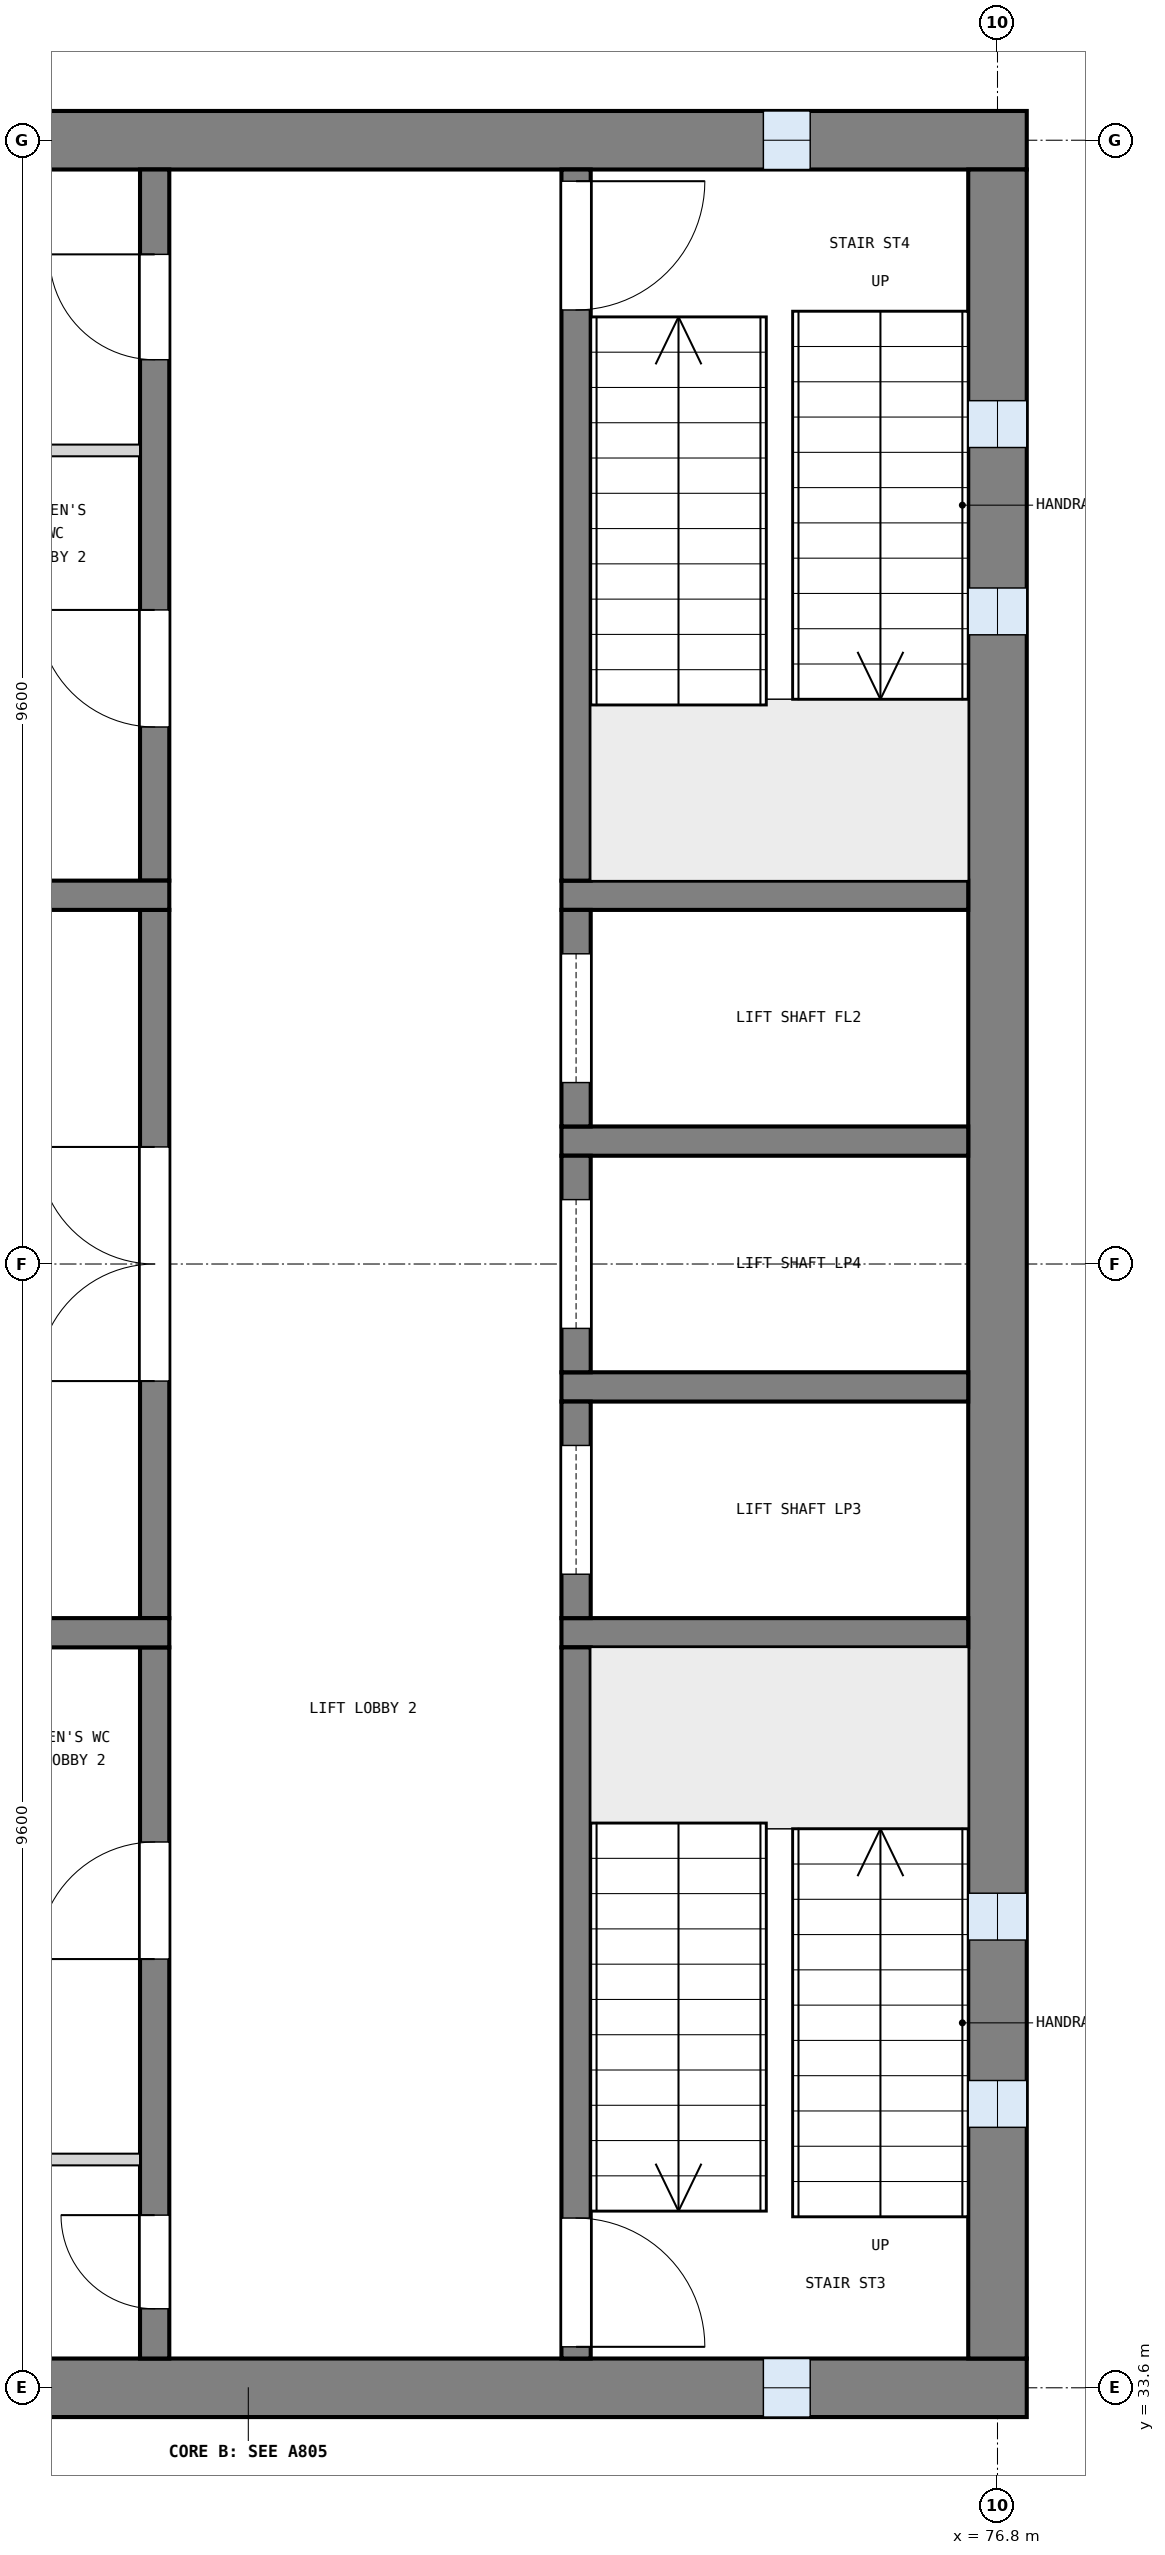
"""IFC4 building model, lengths in metres.
Left out: names, types, materials, properties, quantities, classifications, styles, units other than length and angle.
Written with IfcOpenShell. Run it as: python <this file> out.ifc"""

import sys

from ifc_helpers import new_model, si_unit, direction, frame, frame_2d, origin, place, context, subcontext, project, spatial, rectangle, extrude, element, fill, save


model = new_model("IFC4")
c1 = context("Model", 3, precision=1e-05, world=origin(), true_north=direction((0.0, 1.0)))
c2 = subcontext(c1, "Body", "Model", "MODEL_VIEW")
j1 = project(units=[si_unit("LENGTHUNIT", "METRE"), si_unit("PLANEANGLEUNIT", "RADIAN")], contexts=[c1])
p1 = place(None, origin())
s1 = spatial("IfcSite", under=j1, at=p1, CompositionType="ELEMENT")
p2 = place(p1, origin())
s2 = spatial("IfcBuilding", under=s1, at=p2, CompositionType="ELEMENT")
p3 = place(p2, frame((0.0, 0.0, 12.9)))
s3 = spatial("IfcBuildingStorey", under=s2, at=p3, CompositionType="ELEMENT", Elevation=12.9)
p4 = place(p3, frame((63.75, 52.8, 0.0), z_axis=(0.0, 0.0, 1.0), x_axis=(1.0, 0.0, 0.0)))
e1 = element("IfcWall", 1, at=p4, inside=s3, PredefinedType="SHEAR", context=c2, shape_type="SweptSolid", body=[
    extrude(rectangle(XDim=13.3, YDim=0.5, at=frame_2d((6.65, 0.0))), origin(), (0.0, 0.0, 1.0), 4.2),
])
p5 = place(p4, frame((11.05, 0.0, 1.0)))
e2 = element("IfcOpeningElement", 2, at=p5, cuts=e1, PredefinedType="OPENING", context=c2, shape_type="SweptSolid", body=[
    extrude(rectangle(XDim=0.4, YDim=2.0, at=frame_2d((0.2, 1.0))), frame((0.0, 0.26, 0.0), z_axis=(0.0, -1.0, 0.0), x_axis=(1.0, 0.0, 0.0)), (0.0, 0.0, 1.0), 0.52),
])
p6 = place(p3, frame((63.75, 33.6, 0.0), z_axis=(0.0, 0.0, 1.0), x_axis=(1.0, 0.0, 0.0)))
e3 = element("IfcWall", 3, at=p6, inside=s3, PredefinedType="SHEAR", context=c2, shape_type="SweptSolid", body=[
    extrude(rectangle(XDim=13.3, YDim=0.5, at=frame_2d((6.65, 0.0))), origin(), (0.0, 0.0, 1.0), 4.2),
])
p7 = place(p6, frame((11.05, 0.0, 1.0)))
e4 = element("IfcOpeningElement", 4, at=p7, cuts=e3, PredefinedType="OPENING", context=c2, shape_type="SweptSolid", body=[
    extrude(rectangle(XDim=0.4, YDim=2.0, at=frame_2d((0.2, 1.0))), frame((0.0, 0.26, 0.0), z_axis=(0.0, -1.0, 0.0), x_axis=(1.0, 0.0, 0.0)), (0.0, 0.0, 1.0), 0.52),
])
p8 = place(p3, frame((76.8, 33.85, 0.0), z_axis=(0.0, 0.0, 1.0), x_axis=(0.0, 1.0, 0.0)))
e5 = element("IfcWall", 5, at=p8, inside=s3, PredefinedType="SHEAR", context=c2, shape_type="SweptSolid", body=[
    extrude(rectangle(XDim=18.7, YDim=0.5, at=frame_2d((9.35, 0.0))), origin(), (0.0, 0.0, 1.0), 4.2),
])
p9 = place(p8, frame((1.975, 0.0, 1.0)))
e6 = element("IfcOpeningElement", 6, at=p9, cuts=e5, PredefinedType="OPENING", context=c2, shape_type="SweptSolid", body=[
    extrude(rectangle(XDim=0.4, YDim=2.0, at=frame_2d((0.2, 1.0))), frame((0.0, 0.26, 0.0), z_axis=(0.0, -1.0, 0.0), x_axis=(1.0, 0.0, 0.0)), (0.0, 0.0, 1.0), 0.52),
])
p10 = place(p8, frame((3.575, 0.0, 1.0)))
e7 = element("IfcOpeningElement", 7, at=p10, cuts=e5, PredefinedType="OPENING", context=c2, shape_type="SweptSolid", body=[
    extrude(rectangle(XDim=0.4, YDim=2.0, at=frame_2d((0.2, 1.0))), frame((0.0, 0.26, 0.0), z_axis=(0.0, -1.0, 0.0), x_axis=(1.0, 0.0, 0.0)), (0.0, 0.0, 1.0), 0.52),
])
p11 = place(p8, frame((14.725, 0.0, 1.0)))
e8 = element("IfcOpeningElement", 8, at=p11, cuts=e5, PredefinedType="OPENING", context=c2, shape_type="SweptSolid", body=[
    extrude(rectangle(XDim=0.4, YDim=2.0, at=frame_2d((0.2, 1.0))), frame((0.0, 0.26, 0.0), z_axis=(0.0, -1.0, 0.0), x_axis=(1.0, 0.0, 0.0)), (0.0, 0.0, 1.0), 0.52),
])
p12 = place(p8, frame((16.325, 0.0, 1.0)))
e9 = element("IfcOpeningElement", 9, at=p12, cuts=e5, PredefinedType="OPENING", context=c2, shape_type="SweptSolid", body=[
    extrude(rectangle(XDim=0.4, YDim=2.0, at=frame_2d((0.2, 1.0))), frame((0.0, 0.26, 0.0), z_axis=(0.0, -1.0, 0.0), x_axis=(1.0, 0.0, 0.0)), (0.0, 0.0, 1.0), 0.52),
])
for number, where, z_axis, x_axis in (
    (10, (76.55, 40.05, 0.0), (0.0, 0.0, 1.0), (-1.0, 0.0, 0.0)),
    (11, (76.55, 42.15, 0.0), (0.0, 0.0, 1.0), (-1.0, 0.0, 0.0)),
    (12, (76.55, 44.25, 0.0), (0.0, 0.0, 1.0), (-1.0, 0.0, 0.0)),
    (13, (76.55, 46.35, 0.0), (0.0, 0.0, 1.0), (-1.0, 0.0, 0.0)),
):
    element("IfcWall", number, at=place(p3, frame(where, z_axis=z_axis, x_axis=x_axis)), inside=s3, PredefinedType="SOLIDWALL", context=c2, shape_type="SweptSolid", body=[
        extrude(rectangle(XDim=3.475, YDim=0.25, at=frame_2d((1.738, 0.0))), origin(), (0.0, 0.0, 1.0), 3.9),
    ])
p13 = place(p3, frame((73.2, 33.85, 0.0), z_axis=(0.0, 0.0, 1.0), x_axis=(0.0, 1.0, 0.0)))
e14 = element("IfcWall", 14, at=p13, inside=s3, PredefinedType="SOLIDWALL", context=c2, shape_type="SweptSolid", body=[
    extrude(rectangle(XDim=6.075, YDim=0.25, at=frame_2d((3.038, 0.0))), origin(), (0.0, 0.0, 1.0), 3.9),
])
p14 = place(p13, frame((0.1, 0.0, 0.0)))
e15 = element("IfcOpeningElement", 15, at=p14, cuts=e14, PredefinedType="OPENING", context=c2, shape_type="SweptSolid", body=[
    extrude(rectangle(XDim=1.1, YDim=2.1, at=frame_2d((0.55, 1.05))), frame((0.0, 0.135, 0.0), z_axis=(0.0, -1.0, 0.0), x_axis=(1.0, 0.0, 0.0)), (0.0, 0.0, 1.0), 0.27),
])
p15 = place(p3, frame((73.2, 40.175, 0.0), z_axis=(0.0, 0.0, 1.0), x_axis=(0.0, 1.0, 0.0)))
e16 = element("IfcWall", 16, at=p15, inside=s3, PredefinedType="SOLIDWALL", context=c2, shape_type="SweptSolid", body=[
    extrude(rectangle(XDim=1.85, YDim=0.25, at=frame_2d((0.925, 0.0))), origin(), (0.0, 0.0, 1.0), 3.9),
])
p16 = place(p15, frame((0.375, 0.0, 0.0)))
e17 = element("IfcOpeningElement", 17, at=p16, cuts=e16, PredefinedType="OPENING", context=c2, shape_type="SweptSolid", body=[
    extrude(rectangle(XDim=1.1, YDim=2.1, at=frame_2d((0.55, 1.05))), frame((0.0, 0.135, 0.0), z_axis=(0.0, -1.0, 0.0), x_axis=(1.0, 0.0, 0.0)), (0.0, 0.0, 1.0), 0.27),
])
p17 = place(p3, frame((73.2, 42.275, 0.0), z_axis=(0.0, 0.0, 1.0), x_axis=(0.0, 1.0, 0.0)))
e18 = element("IfcWall", 18, at=p17, inside=s3, PredefinedType="SOLIDWALL", context=c2, shape_type="SweptSolid", body=[
    extrude(rectangle(XDim=1.85, YDim=0.25, at=frame_2d((0.925, 0.0))), origin(), (0.0, 0.0, 1.0), 3.9),
])
p18 = place(p17, frame((0.375, 0.0, 0.0)))
e19 = element("IfcOpeningElement", 19, at=p18, cuts=e18, PredefinedType="OPENING", context=c2, shape_type="SweptSolid", body=[
    extrude(rectangle(XDim=1.1, YDim=2.1, at=frame_2d((0.55, 1.05))), frame((0.0, 0.135, 0.0), z_axis=(0.0, -1.0, 0.0), x_axis=(1.0, 0.0, 0.0)), (0.0, 0.0, 1.0), 0.27),
])
p19 = place(p3, frame((73.2, 44.375, 0.0), z_axis=(0.0, 0.0, 1.0), x_axis=(0.0, 1.0, 0.0)))
e20 = element("IfcWall", 20, at=p19, inside=s3, PredefinedType="SOLIDWALL", context=c2, shape_type="SweptSolid", body=[
    extrude(rectangle(XDim=1.85, YDim=0.25, at=frame_2d((0.925, 0.0))), origin(), (0.0, 0.0, 1.0), 3.9),
])
p20 = place(p19, frame((0.375, 0.0, 0.0)))
e21 = element("IfcOpeningElement", 21, at=p20, cuts=e20, PredefinedType="OPENING", context=c2, shape_type="SweptSolid", body=[
    extrude(rectangle(XDim=1.1, YDim=2.1, at=frame_2d((0.55, 1.05))), frame((0.0, 0.135, 0.0), z_axis=(0.0, -1.0, 0.0), x_axis=(1.0, 0.0, 0.0)), (0.0, 0.0, 1.0), 0.27),
])
p21 = place(p3, frame((73.2, 46.475, 0.0), z_axis=(0.0, 0.0, 1.0), x_axis=(0.0, 1.0, 0.0)))
e22 = element("IfcWall", 22, at=p21, inside=s3, PredefinedType="SOLIDWALL", context=c2, shape_type="SweptSolid", body=[
    extrude(rectangle(XDim=6.075, YDim=0.25, at=frame_2d((3.038, 0.0))), origin(), (0.0, 0.0, 1.0), 3.9),
])
p22 = place(p21, frame((4.875, 0.0, 0.0)))
e23 = element("IfcOpeningElement", 23, at=p22, cuts=e22, PredefinedType="OPENING", context=c2, shape_type="SweptSolid", body=[
    extrude(rectangle(XDim=1.1, YDim=2.1, at=frame_2d((0.55, 1.05))), frame((0.0, 0.135, 0.0), z_axis=(0.0, -1.0, 0.0), x_axis=(1.0, 0.0, 0.0)), (0.0, 0.0, 1.0), 0.27),
])
p23 = place(p3, frame((69.6, 33.85, 0.0), z_axis=(0.0, 0.0, 1.0), x_axis=(0.0, 1.0, 0.0)))
e24 = element("IfcWall", 24, at=p23, inside=s3, PredefinedType="SOLIDWALL", context=c2, shape_type="SweptSolid", body=[
    extrude(rectangle(XDim=6.075, YDim=0.25, at=frame_2d((3.038, 0.0))), origin(), (0.0, 0.0, 1.0), 3.9),
])
p24 = place(p23, frame((0.425, 0.0, 0.0)))
e25 = element("IfcOpeningElement", 25, at=p24, cuts=e24, PredefinedType="OPENING", context=c2, shape_type="SweptSolid", body=[
    extrude(rectangle(XDim=0.8, YDim=2.1, at=frame_2d((0.4, 1.05))), frame((0.0, 0.135, 0.0), z_axis=(0.0, -1.0, 0.0), x_axis=(1.0, 0.0, 0.0)), (0.0, 0.0, 1.0), 0.27),
])
p25 = place(p23, frame((3.413, 0.0, 0.0)))
e26 = element("IfcOpeningElement", 26, at=p25, cuts=e24, PredefinedType="OPENING", context=c2, shape_type="SweptSolid", body=[
    extrude(rectangle(XDim=1.0, YDim=2.1, at=frame_2d((0.5, 1.05))), frame((0.0, 0.135, 0.0), z_axis=(0.0, -1.0, 0.0), x_axis=(1.0, 0.0, 0.0)), (0.0, 0.0, 1.0), 0.27),
])
p26 = place(p3, frame((69.6, 40.175, 0.0), z_axis=(0.0, 0.0, 1.0), x_axis=(0.0, 1.0, 0.0)))
e27 = element("IfcWall", 27, at=p26, inside=s3, PredefinedType="SOLIDWALL", context=c2, shape_type="SweptSolid", body=[
    extrude(rectangle(XDim=6.05, YDim=0.25, at=frame_2d((3.025, 0.0))), origin(), (0.0, 0.0, 1.0), 3.9),
])
p27 = place(p26, frame((2.025, 0.0, 0.0)))
e28 = element("IfcOpeningElement", 28, at=p27, cuts=e27, PredefinedType="OPENING", context=c2, shape_type="SweptSolid", body=[
    extrude(rectangle(XDim=2.0, YDim=2.1, at=frame_2d((1.0, 1.05))), frame((0.0, 0.135, 0.0), z_axis=(0.0, -1.0, 0.0), x_axis=(1.0, 0.0, 0.0)), (0.0, 0.0, 1.0), 0.27),
])
p28 = place(p3, frame((69.6, 46.475, 0.0), z_axis=(0.0, 0.0, 1.0), x_axis=(0.0, 1.0, 0.0)))
e29 = element("IfcWall", 29, at=p28, inside=s3, PredefinedType="SOLIDWALL", context=c2, shape_type="SweptSolid", body=[
    extrude(rectangle(XDim=6.075, YDim=0.25, at=frame_2d((3.038, 0.0))), origin(), (0.0, 0.0, 1.0), 3.9),
])
p29 = place(p28, frame((1.312, 0.0, 0.0)))
e30 = element("IfcOpeningElement", 30, at=p29, cuts=e29, PredefinedType="OPENING", context=c2, shape_type="SweptSolid", body=[
    extrude(rectangle(XDim=1.0, YDim=2.1, at=frame_2d((0.5, 1.05))), frame((0.0, 0.135, 0.0), z_axis=(0.0, -1.0, 0.0), x_axis=(1.0, 0.0, 0.0)), (0.0, 0.0, 1.0), 0.27),
])
p30 = place(p28, frame((4.45, 0.0, 0.0)))
e31 = element("IfcOpeningElement", 31, at=p30, cuts=e29, PredefinedType="OPENING", context=c2, shape_type="SweptSolid", body=[
    extrude(rectangle(XDim=0.9, YDim=2.1, at=frame_2d((0.45, 1.05))), frame((0.0, 0.135, 0.0), z_axis=(0.0, -1.0, 0.0), x_axis=(1.0, 0.0, 0.0)), (0.0, 0.0, 1.0), 0.27),
])
for number, where, z_axis, x_axis in (
    (32, (69.725, 40.05, 0.0), (0.0, 0.0, 1.0), (-1.0, 0.0, 0.0)),
    (33, (69.725, 46.35, 0.0), (0.0, 0.0, 1.0), (-1.0, 0.0, 0.0)),
):
    element("IfcWall", number, at=place(p3, frame(where, z_axis=z_axis, x_axis=x_axis)), inside=s3, PredefinedType="SOLIDWALL", context=c2, shape_type="SweptSolid", body=[
        extrude(rectangle(XDim=5.475, YDim=0.25, at=frame_2d((2.738, 0.0))), origin(), (0.0, 0.0, 1.0), 3.9),
    ])
for number, where, z_axis, x_axis in (
    (34, (69.475, 35.55, 0.0), (0.0, 0.0, 1.0), (-1.0, 0.0, 0.0)),
    (35, (69.475, 50.15, 0.0), (0.0, 0.0, 1.0), (-1.0, 0.0, 0.0)),
):
    element("IfcWall", number, at=place(p3, frame(where, z_axis=z_axis, x_axis=x_axis)), inside=s3, PredefinedType="PARTITIONING", context=c2, shape_type="SweptSolid", body=[
        extrude(rectangle(XDim=5.225, YDim=0.1, at=frame_2d((2.613, 0.0))), origin(), (0.0, 0.0, 1.0), 3.9),
    ])
p31 = place(p9, origin())
e36 = element("IfcWindow", 36, at=p31, inside=s3, PartitioningType="SINGLE_PANEL", PredefinedType="WINDOW", context=c2, shape_type="SweptSolid", body=[
    extrude(rectangle(XDim=0.4, YDim=2.0, at=frame_2d((0.2, 1.0))), frame((0.0, 0.03, 0.0), z_axis=(0.0, -1.0, 0.0), x_axis=(1.0, 0.0, 0.0)), (0.0, 0.0, 1.0), 0.06),
])
fill(e6, e36)
p32 = place(p10, origin())
e37 = element("IfcWindow", 37, at=p32, inside=s3, PartitioningType="SINGLE_PANEL", PredefinedType="WINDOW", context=c2, shape_type="SweptSolid", body=[
    extrude(rectangle(XDim=0.4, YDim=2.0, at=frame_2d((0.2, 1.0))), frame((0.0, 0.03, 0.0), z_axis=(0.0, -1.0, 0.0), x_axis=(1.0, 0.0, 0.0)), (0.0, 0.0, 1.0), 0.06),
])
fill(e7, e37)
p33 = place(p11, origin())
e38 = element("IfcWindow", 38, at=p33, inside=s3, PartitioningType="SINGLE_PANEL", PredefinedType="WINDOW", context=c2, shape_type="SweptSolid", body=[
    extrude(rectangle(XDim=0.4, YDim=2.0, at=frame_2d((0.2, 1.0))), frame((0.0, 0.03, 0.0), z_axis=(0.0, -1.0, 0.0), x_axis=(1.0, 0.0, 0.0)), (0.0, 0.0, 1.0), 0.06),
])
fill(e8, e38)
p34 = place(p12, origin())
e39 = element("IfcWindow", 39, at=p34, inside=s3, PartitioningType="SINGLE_PANEL", PredefinedType="WINDOW", context=c2, shape_type="SweptSolid", body=[
    extrude(rectangle(XDim=0.4, YDim=2.0, at=frame_2d((0.2, 1.0))), frame((0.0, 0.03, 0.0), z_axis=(0.0, -1.0, 0.0), x_axis=(1.0, 0.0, 0.0)), (0.0, 0.0, 1.0), 0.06),
])
fill(e9, e39)
p35 = place(p7, origin())
e40 = element("IfcWindow", 40, at=p35, inside=s3, PartitioningType="SINGLE_PANEL", PredefinedType="WINDOW", context=c2, shape_type="SweptSolid", body=[
    extrude(rectangle(XDim=0.4, YDim=2.0, at=frame_2d((0.2, 1.0))), frame((0.0, 0.03, 0.0), z_axis=(0.0, -1.0, 0.0), x_axis=(1.0, 0.0, 0.0)), (0.0, 0.0, 1.0), 0.06),
])
fill(e4, e40)
p36 = place(p5, origin())
e41 = element("IfcWindow", 41, at=p36, inside=s3, PartitioningType="SINGLE_PANEL", PredefinedType="WINDOW", context=c2, shape_type="SweptSolid", body=[
    extrude(rectangle(XDim=0.4, YDim=2.0, at=frame_2d((0.2, 1.0))), frame((0.0, 0.03, 0.0), z_axis=(0.0, -1.0, 0.0), x_axis=(1.0, 0.0, 0.0)), (0.0, 0.0, 1.0), 0.06),
])
fill(e2, e41)
p37 = place(p14, frame((1.1, 0.0, 0.0), z_axis=(0.0, 0.0, 1.0), x_axis=(-1.0, 0.0, 0.0)))
e42 = element("IfcDoor", 42, at=p37, inside=s3, OperationType="SINGLE_SWING_RIGHT", PredefinedType="DOOR", context=c2, shape_type="SweptSolid", body=[
    extrude(rectangle(XDim=1.1, YDim=2.1, at=frame_2d((0.55, 1.05))), frame((0.0, 0.025, 0.0), z_axis=(0.0, -1.0, 0.0), x_axis=(1.0, 0.0, 0.0)), (0.0, 0.0, 1.0), 0.05),
])
fill(e15, e42)
p38 = place(p22, frame((1.1, 0.0, 0.0), z_axis=(0.0, 0.0, 1.0), x_axis=(-1.0, 0.0, 0.0)))
e43 = element("IfcDoor", 43, at=p38, inside=s3, OperationType="SINGLE_SWING_LEFT", PredefinedType="DOOR", context=c2, shape_type="SweptSolid", body=[
    extrude(rectangle(XDim=1.1, YDim=2.1, at=frame_2d((0.55, 1.05))), frame((0.0, 0.025, 0.0), z_axis=(0.0, -1.0, 0.0), x_axis=(1.0, 0.0, 0.0)), (0.0, 0.0, 1.0), 0.05),
])
fill(e23, e43)
p39 = place(p16, origin())
e44 = element("IfcDoor", 44, at=p39, inside=s3, OperationType="SLIDING_TO_LEFT", PredefinedType="DOOR", context=c2, shape_type="SweptSolid", body=[
    extrude(rectangle(XDim=1.1, YDim=2.1, at=frame_2d((0.55, 1.05))), frame((0.0, 0.025, 0.0), z_axis=(0.0, -1.0, 0.0), x_axis=(1.0, 0.0, 0.0)), (0.0, 0.0, 1.0), 0.05),
])
fill(e17, e44)
p40 = place(p18, origin())
e45 = element("IfcDoor", 45, at=p40, inside=s3, OperationType="SLIDING_TO_LEFT", PredefinedType="DOOR", context=c2, shape_type="SweptSolid", body=[
    extrude(rectangle(XDim=1.1, YDim=2.1, at=frame_2d((0.55, 1.05))), frame((0.0, 0.025, 0.0), z_axis=(0.0, -1.0, 0.0), x_axis=(1.0, 0.0, 0.0)), (0.0, 0.0, 1.0), 0.05),
])
fill(e19, e45)
p41 = place(p20, origin())
e46 = element("IfcDoor", 46, at=p41, inside=s3, OperationType="SLIDING_TO_LEFT", PredefinedType="DOOR", context=c2, shape_type="SweptSolid", body=[
    extrude(rectangle(XDim=1.1, YDim=2.1, at=frame_2d((0.55, 1.05))), frame((0.0, 0.025, 0.0), z_axis=(0.0, -1.0, 0.0), x_axis=(1.0, 0.0, 0.0)), (0.0, 0.0, 1.0), 0.05),
])
fill(e21, e46)
p42 = place(p27, origin())
e47 = element("IfcDoor", 47, at=p42, inside=s3, OperationType="DOUBLE_DOOR_SINGLE_SWING", PredefinedType="DOOR", context=c2, shape_type="SweptSolid", body=[
    extrude(rectangle(XDim=2.0, YDim=2.1, at=frame_2d((1.0, 1.05))), frame((0.0, 0.025, 0.0), z_axis=(0.0, -1.0, 0.0), x_axis=(1.0, 0.0, 0.0)), (0.0, 0.0, 1.0), 0.05),
])
fill(e28, e47)
p43 = place(p24, origin())
e48 = element("IfcDoor", 48, at=p43, inside=s3, OperationType="SINGLE_SWING_RIGHT", PredefinedType="DOOR", context=c2, shape_type="SweptSolid", body=[
    extrude(rectangle(XDim=0.8, YDim=2.1, at=frame_2d((0.4, 1.05))), frame((0.0, 0.025, 0.0), z_axis=(0.0, -1.0, 0.0), x_axis=(1.0, 0.0, 0.0)), (0.0, 0.0, 1.0), 0.05),
])
fill(e25, e48)
p44 = place(p25, origin())
e49 = element("IfcDoor", 49, at=p44, inside=s3, OperationType="SINGLE_SWING_LEFT", PredefinedType="DOOR", context=c2, shape_type="SweptSolid", body=[
    extrude(rectangle(XDim=1.0, YDim=2.1, at=frame_2d((0.5, 1.05))), frame((0.0, 0.025, 0.0), z_axis=(0.0, -1.0, 0.0), x_axis=(1.0, 0.0, 0.0)), (0.0, 0.0, 1.0), 0.05),
])
fill(e26, e49)
p45 = place(p29, origin())
e50 = element("IfcDoor", 50, at=p45, inside=s3, OperationType="SINGLE_SWING_RIGHT", PredefinedType="DOOR", context=c2, shape_type="SweptSolid", body=[
    extrude(rectangle(XDim=1.0, YDim=2.1, at=frame_2d((0.5, 1.05))), frame((0.0, 0.025, 0.0), z_axis=(0.0, -1.0, 0.0), x_axis=(1.0, 0.0, 0.0)), (0.0, 0.0, 1.0), 0.05),
])
fill(e30, e50)
p46 = place(p30, origin())
e51 = element("IfcDoor", 51, at=p46, inside=s3, OperationType="SINGLE_SWING_RIGHT", PredefinedType="DOOR", context=c2, shape_type="SweptSolid", body=[
    extrude(rectangle(XDim=0.9, YDim=2.1, at=frame_2d((0.45, 1.05))), frame((0.0, 0.025, 0.0), z_axis=(0.0, -1.0, 0.0), x_axis=(1.0, 0.0, 0.0)), (0.0, 0.0, 1.0), 0.05),
])
fill(e31, e51)
save(model, sys.argv[1])
